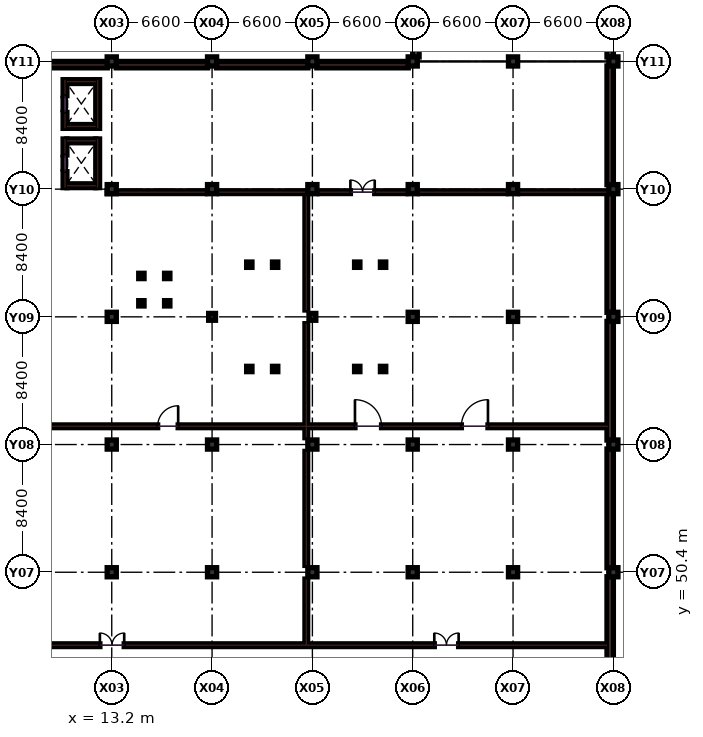
"""IFC4 building model, lengths in metres.
Left out: names, types, materials, properties, quantities, classifications, styles, units other than length and angle.
Written with IfcOpenShell. Run it as: python <this file> out.ifc"""

import sys

from ifc_helpers import new_model, si_unit, direction, frame, frame_2d, origin, origin_2d, place, context, subcontext, project, spatial, rectangle, extrude, element, fill, save


model = new_model("IFC4")
c1 = context("Model", 3, precision=1e-05, world=origin(), true_north=direction((0.0, 1.0)))
c2 = subcontext(c1, "Body", "Model", "MODEL_VIEW")
j1 = project(units=[si_unit("LENGTHUNIT", "METRE"), si_unit("PLANEANGLEUNIT", "RADIAN")], contexts=[c1])
p1 = place(None, origin())
s1 = spatial("IfcSite", under=j1, at=p1, CompositionType="ELEMENT")
p2 = place(p1, origin())
s2 = spatial("IfcBuilding", under=s1, at=p2, CompositionType="ELEMENT")
p3 = place(p2, frame((0.0, 0.0, -4.5)))
s3 = spatial("IfcBuildingStorey", under=s2, at=p3, CompositionType="ELEMENT", Elevation=-4.5)
for number, where, z_axis, x_axis in (
    (1, (13.2, 50.4, 0.0), (0.0, 0.0, 1.0), (1.0, 0.0, 0.0)),
    (2, (13.2, 58.8, 0.0), (0.0, 0.0, 1.0), (1.0, 0.0, 0.0)),
    (3, (13.2, 67.2, 0.0), (0.0, 0.0, 1.0), (1.0, 0.0, 0.0)),
    (4, (13.2, 75.6, 0.0), (0.0, 0.0, 1.0), (1.0, 0.0, 0.0)),
    (5, (13.2, 84.0, 0.0), (0.0, 0.0, 1.0), (1.0, 0.0, 0.0)),
    (6, (19.8, 50.4, 0.0), (0.0, 0.0, 1.0), (1.0, 0.0, 0.0)),
    (7, (19.8, 58.8, 0.0), (0.0, 0.0, 1.0), (1.0, 0.0, 0.0)),
):
    element("IfcColumn", number, at=place(p3, frame(where, z_axis=z_axis, x_axis=x_axis)), inside=s3, PredefinedType="COLUMN", context=c2, shape_type="SweptSolid", body=[
        extrude(rectangle(XDim=0.6, YDim=0.6, at=origin_2d()), origin(), (0.0, 0.0, 1.0), 4.5),
    ])
p4 = place(p3, frame((19.8, 67.2, 0.0), z_axis=(0.0, 0.0, 1.0), x_axis=(1.0, 0.0, 0.0)))
e8 = element("IfcColumn", 8, at=p4, inside=s3, PredefinedType="COLUMN", context=c2, shape_type="SweptSolid", body=[
    extrude(rectangle(XDim=0.45, YDim=0.45, at=origin_2d()), origin(), (0.0, 0.0, 1.0), 4.5),
])
for number, where, z_axis, x_axis in (
    (9, (19.8, 75.6, 0.0), (0.0, 0.0, 1.0), (1.0, 0.0, 0.0)),
    (10, (19.8, 84.0, 0.0), (0.0, 0.0, 1.0), (1.0, 0.0, 0.0)),
    (11, (26.4, 50.4, 0.0), (0.0, 0.0, 1.0), (1.0, 0.0, 0.0)),
    (12, (26.4, 58.8, 0.0), (0.0, 0.0, 1.0), (1.0, 0.0, 0.0)),
):
    element("IfcColumn", number, at=place(p3, frame(where, z_axis=z_axis, x_axis=x_axis)), inside=s3, PredefinedType="COLUMN", context=c2, shape_type="SweptSolid", body=[
        extrude(rectangle(XDim=0.6, YDim=0.6, at=origin_2d()), origin(), (0.0, 0.0, 1.0), 4.5),
    ])
p5 = place(p3, frame((26.4, 67.2, 0.0), z_axis=(0.0, 0.0, 1.0), x_axis=(1.0, 0.0, 0.0)))
e13 = element("IfcColumn", 13, at=p5, inside=s3, PredefinedType="COLUMN", context=c2, shape_type="SweptSolid", body=[
    extrude(rectangle(XDim=0.45, YDim=0.45, at=origin_2d()), origin(), (0.0, 0.0, 1.0), 4.5),
])
for number, where, z_axis, x_axis in (
    (14, (26.4, 75.6, 0.0), (0.0, 0.0, 1.0), (1.0, 0.0, 0.0)),
    (15, (26.4, 84.0, 0.0), (0.0, 0.0, 1.0), (1.0, 0.0, 0.0)),
    (16, (33.0, 50.4, 0.0), (0.0, 0.0, 1.0), (1.0, 0.0, 0.0)),
    (17, (33.0, 58.8, 0.0), (0.0, 0.0, 1.0), (1.0, 0.0, 0.0)),
    (18, (33.0, 67.2, 0.0), (0.0, 0.0, 1.0), (1.0, 0.0, 0.0)),
    (19, (33.0, 75.6, 0.0), (0.0, 0.0, 1.0), (1.0, 0.0, 0.0)),
    (20, (33.0, 84.0, 0.0), (0.0, 0.0, 1.0), (1.0, 0.0, 0.0)),
    (21, (39.6, 50.4, 0.0), (0.0, 0.0, 1.0), (1.0, 0.0, 0.0)),
    (22, (39.6, 58.8, 0.0), (0.0, 0.0, 1.0), (1.0, 0.0, 0.0)),
    (23, (39.6, 67.2, 0.0), (0.0, 0.0, 1.0), (1.0, 0.0, 0.0)),
    (24, (39.6, 75.6, 0.0), (0.0, 0.0, 1.0), (1.0, 0.0, 0.0)),
    (25, (39.6, 84.0, 0.0), (0.0, 0.0, 1.0), (1.0, 0.0, 0.0)),
    (26, (46.2, 50.4, 0.0), (0.0, 0.0, 1.0), (1.0, 0.0, 0.0)),
    (27, (46.2, 58.8, 0.0), (0.0, 0.0, 1.0), (1.0, 0.0, 0.0)),
    (28, (46.2, 67.2, 0.0), (0.0, 0.0, 1.0), (1.0, 0.0, 0.0)),
    (29, (46.2, 75.6, 0.0), (0.0, 0.0, 1.0), (1.0, 0.0, 0.0)),
    (30, (46.2, 84.0, 0.0), (0.0, 0.0, 1.0), (1.0, 0.0, 0.0)),
):
    element("IfcColumn", number, at=place(p3, frame(where, z_axis=z_axis, x_axis=x_axis)), inside=s3, PredefinedType="COLUMN", context=c2, shape_type="SweptSolid", body=[
        extrude(rectangle(XDim=0.6, YDim=0.6, at=origin_2d()), origin(), (0.0, 0.0, 1.0), 4.5),
    ])
p6 = place(p3, frame((0.42, 45.6, 0.0), z_axis=(0.0, 0.0, 1.0), x_axis=(1.0, 0.0, 0.0)))
e31 = element("IfcWall", 31, at=p6, inside=s3, PredefinedType="SOLIDWALL", context=c2, shape_type="SweptSolid", body=[
    extrude(rectangle(XDim=45.36, YDim=0.18, at=frame_2d((22.68, 0.0))), origin(), (0.0, 0.0, 1.0), 3.29),
])
p7 = place(p6, frame((12.0, 0.0, 0.0)))
e32 = element("IfcOpeningElement", 32, at=p7, cuts=e31, PredefinedType="OPENING", context=c2, shape_type="SweptSolid", body=[
    extrude(rectangle(XDim=1.6, YDim=2.2, at=frame_2d((0.8, 1.1))), frame((0.0, 0.1, 0.0), z_axis=(0.0, -1.0, 0.0), x_axis=(1.0, 0.0, 0.0)), (0.0, 0.0, 1.0), 0.2),
])
p8 = place(p6, frame((34.0, 0.0, 0.0)))
e33 = element("IfcOpeningElement", 33, at=p8, cuts=e31, PredefinedType="OPENING", context=c2, shape_type="SweptSolid", body=[
    extrude(rectangle(XDim=1.6, YDim=2.2, at=frame_2d((0.8, 1.1))), frame((0.0, 0.1, 0.0), z_axis=(0.0, -1.0, 0.0), x_axis=(1.0, 0.0, 0.0)), (0.0, 0.0, 1.0), 0.2),
])
p9 = place(p3, frame((26.0, 45.6, 0.0), z_axis=(0.0, 0.0, 1.0), x_axis=(0.0, 1.0, 0.0)))
e34 = element("IfcWall", 34, at=p9, inside=s3, PredefinedType="SOLIDWALL", context=c2, shape_type="SweptSolid", body=[
    extrude(rectangle(XDim=4.35, YDim=0.18, at=frame_2d((2.175, 0.0))), origin(), (0.0, 0.0, 1.0), 3.29),
])
for number, where, z_axis, x_axis in (
    (35, (26.0, 50.85, 0.0), (0.0, 0.0, 1.0), (0.0, 1.0, 0.0)),
    (36, (26.0, 59.25, 0.0), (0.0, 0.0, 1.0), (0.0, 1.0, 0.0)),
):
    element("IfcWall", number, at=place(p3, frame(where, z_axis=z_axis, x_axis=x_axis)), inside=s3, PredefinedType="SOLIDWALL", context=c2, shape_type="SweptSolid", body=[
        extrude(rectangle(XDim=7.5, YDim=0.18, at=frame_2d((3.75, 0.0))), origin(), (0.0, 0.0, 1.0), 3.29),
    ])
p10 = place(p3, frame((26.0, 67.65, 0.0), z_axis=(0.0, 0.0, 1.0), x_axis=(0.0, 1.0, 0.0)))
e37 = element("IfcWall", 37, at=p10, inside=s3, PredefinedType="SOLIDWALL", context=c2, shape_type="SweptSolid", body=[
    extrude(rectangle(XDim=7.75, YDim=0.18, at=frame_2d((3.875, 0.0))), origin(), (0.0, 0.0, 1.0), 3.29),
])
p11 = place(p3, frame((12.9, 75.4, 0.0), z_axis=(0.0, 0.0, 1.0), x_axis=(1.0, 0.0, 0.0)))
e38 = element("IfcWall", 38, at=p11, inside=s3, PredefinedType="SOLIDWALL", context=c2, shape_type="SweptSolid", body=[
    extrude(rectangle(XDim=6.45, YDim=0.18, at=frame_2d((3.225, 0.0))), origin(), (0.0, 0.0, 1.0), 3.275),
])
p12 = place(p3, frame((20.25, 75.4, 0.0), z_axis=(0.0, 0.0, 1.0), x_axis=(1.0, 0.0, 0.0)))
e39 = element("IfcWall", 39, at=p12, inside=s3, PredefinedType="SOLIDWALL", context=c2, shape_type="SweptSolid", body=[
    extrude(rectangle(XDim=5.7, YDim=0.18, at=frame_2d((2.85, 0.0))), origin(), (0.0, 0.0, 1.0), 3.275),
])
p13 = place(p3, frame((26.85, 75.4, 0.0), z_axis=(0.0, 0.0, 1.0), x_axis=(1.0, 0.0, 0.0)))
e40 = element("IfcWall", 40, at=p13, inside=s3, PredefinedType="SOLIDWALL", context=c2, shape_type="SweptSolid", body=[
    extrude(rectangle(XDim=5.7, YDim=0.18, at=frame_2d((2.85, 0.0))), origin(), (0.0, 0.0, 1.0), 3.275),
])
p14 = place(p13, frame((2.05, 0.0, 0.0)))
e41 = element("IfcOpeningElement", 41, at=p14, cuts=e40, PredefinedType="OPENING", context=c2, shape_type="SweptSolid", body=[
    extrude(rectangle(XDim=1.6, YDim=2.2, at=frame_2d((0.8, 1.1))), frame((0.0, 0.1, 0.0), z_axis=(0.0, -1.0, 0.0), x_axis=(1.0, 0.0, 0.0)), (0.0, 0.0, 1.0), 0.2),
])
p15 = place(p3, frame((33.45, 75.4, 0.0), z_axis=(0.0, 0.0, 1.0), x_axis=(1.0, 0.0, 0.0)))
e42 = element("IfcWall", 42, at=p15, inside=s3, PredefinedType="SOLIDWALL", context=c2, shape_type="SweptSolid", body=[
    extrude(rectangle(XDim=5.7, YDim=0.18, at=frame_2d((2.85, 0.0))), origin(), (0.0, 0.0, 1.0), 3.275),
])
p16 = place(p3, frame((40.05, 75.4, 0.0), z_axis=(0.0, 0.0, 1.0), x_axis=(1.0, 0.0, 0.0)))
e43 = element("IfcWall", 43, at=p16, inside=s3, PredefinedType="SOLIDWALL", context=c2, shape_type="SweptSolid", body=[
    extrude(rectangle(XDim=5.73, YDim=0.18, at=frame_2d((2.865, 0.0))), origin(), (0.0, 0.0, 1.0), 3.275),
])
p17 = place(p3, frame((0.42, 60.0, 0.0), z_axis=(0.0, 0.0, 1.0), x_axis=(1.0, 0.0, 0.0)))
e44 = element("IfcWall", 44, at=p17, inside=s3, PredefinedType="SOLIDWALL", context=c2, shape_type="SweptSolid", body=[
    extrude(rectangle(XDim=25.58, YDim=0.18, at=frame_2d((12.79, 0.0))), origin(), (0.0, 0.0, 1.0), 3.29),
])
p18 = place(p17, frame((3.2, 0.0, 0.0)))
e45 = element("IfcOpeningElement", 45, at=p18, cuts=e44, PredefinedType="OPENING", context=c2, shape_type="SweptSolid", body=[
    extrude(rectangle(XDim=1.35, YDim=2.2, at=frame_2d((0.675, 1.1))), frame((0.0, 0.1, 0.0), z_axis=(0.0, -1.0, 0.0), x_axis=(1.0, 0.0, 0.0)), (0.0, 0.0, 1.0), 0.2),
])
p19 = place(p17, frame((15.8, 0.0, 0.0)))
e46 = element("IfcOpeningElement", 46, at=p19, cuts=e44, PredefinedType="OPENING", context=c2, shape_type="SweptSolid", body=[
    extrude(rectangle(XDim=1.35, YDim=2.2, at=frame_2d((0.675, 1.1))), frame((0.0, 0.1, 0.0), z_axis=(0.0, -1.0, 0.0), x_axis=(1.0, 0.0, 0.0)), (0.0, 0.0, 1.0), 0.2),
])
p20 = place(p3, frame((26.0, 60.0, 0.0), z_axis=(0.0, 0.0, 1.0), x_axis=(1.0, 0.0, 0.0)))
e47 = element("IfcWall", 47, at=p20, inside=s3, PredefinedType="SOLIDWALL", context=c2, shape_type="SweptSolid", body=[
    extrude(rectangle(XDim=19.85, YDim=0.18, at=frame_2d((9.925, 0.0))), origin(), (0.0, 0.0, 1.0), 3.29),
])
p21 = place(p20, frame((3.2, 0.0, 0.0)))
e48 = element("IfcOpeningElement", 48, at=p21, cuts=e47, PredefinedType="OPENING", context=c2, shape_type="SweptSolid", body=[
    extrude(rectangle(XDim=1.75, YDim=2.3, at=frame_2d((0.875, 1.15))), frame((0.0, 0.1, 0.0), z_axis=(0.0, -1.0, 0.0), x_axis=(1.0, 0.0, 0.0)), (0.0, 0.0, 1.0), 0.2),
])
p22 = place(p20, frame((10.2, 0.0, 0.0)))
e49 = element("IfcOpeningElement", 49, at=p22, cuts=e47, PredefinedType="OPENING", context=c2, shape_type="SweptSolid", body=[
    extrude(rectangle(XDim=1.75, YDim=2.3, at=frame_2d((0.875, 1.15))), frame((0.0, 0.1, 0.0), z_axis=(0.0, -1.0, 0.0), x_axis=(1.0, 0.0, 0.0)), (0.0, 0.0, 1.0), 0.2),
])
p23 = place(p3, frame((12.905, 83.79, 0.0), z_axis=(0.0, 0.0, 1.0), x_axis=(-1.0, 0.0, 0.0)))
e50 = element("IfcWall", 50, at=p23, inside=s3, PredefinedType="SOLIDWALL", context=c2, shape_type="SweptSolid", body=[
    extrude(rectangle(XDim=6.01, YDim=0.42, at=frame_2d((3.005, 0.0))), origin(), (0.0, 0.0, 1.0), 4.14),
])
p24 = place(p3, frame((19.505, 83.79, 0.0), z_axis=(0.0, 0.0, 1.0), x_axis=(-1.0, 0.0, 0.0)))
e51 = element("IfcWall", 51, at=p24, inside=s3, PredefinedType="SOLIDWALL", context=c2, shape_type="SweptSolid", body=[
    extrude(rectangle(XDim=6.01, YDim=0.42, at=frame_2d((3.005, 0.0))), origin(), (0.0, 0.0, 1.0), 4.14),
])
for number, where, z_axis, x_axis in (
    (52, (26.105, 83.79, 0.0), (0.0, 0.0, 1.0), (-1.0, 0.0, 0.0)),
    (53, (32.705, 83.79, 0.0), (0.0, 0.0, 1.0), (-1.0, 0.0, 0.0)),
):
    element("IfcWall", number, at=place(p3, frame(where, z_axis=z_axis, x_axis=x_axis)), inside=s3, PredefinedType="SOLIDWALL", context=c2, shape_type="SweptSolid", body=[
        extrude(rectangle(XDim=6.01, YDim=0.42, at=frame_2d((3.005, 0.0))), origin(), (0.0, 0.0, 1.0), 4.14),
    ])
for number, where, z_axis, x_axis in (
    (54, (33.21, 92.105, 0.0), (0.0, 0.0, 1.0), (0.0, -1.0, 0.0)),
    (55, (45.99, 42.295, 0.0), (0.0, 0.0, 1.0), (0.0, 1.0, 0.0)),
):
    element("IfcWall", number, at=place(p3, frame(where, z_axis=z_axis, x_axis=x_axis)), inside=s3, PredefinedType="SOLIDWALL", context=c2, shape_type="SweptSolid", body=[
        extrude(rectangle(XDim=7.81, YDim=0.42, at=frame_2d((3.905, 0.0))), origin(), (0.0, 0.0, 1.0), 4.14),
    ])
p25 = place(p3, frame((45.99, 50.695, 0.0), z_axis=(0.0, 0.0, 1.0), x_axis=(0.0, 1.0, 0.0)))
e56 = element("IfcWall", 56, at=p25, inside=s3, PredefinedType="SOLIDWALL", context=c2, shape_type="SweptSolid", body=[
    extrude(rectangle(XDim=7.81, YDim=0.42, at=frame_2d((3.905, 0.0))), origin(), (0.0, 0.0, 1.0), 4.14),
])
p26 = place(p3, frame((45.99, 59.095, 0.0), z_axis=(0.0, 0.0, 1.0), x_axis=(0.0, 1.0, 0.0)))
e57 = element("IfcWall", 57, at=p26, inside=s3, PredefinedType="SOLIDWALL", context=c2, shape_type="SweptSolid", body=[
    extrude(rectangle(XDim=7.81, YDim=0.42, at=frame_2d((3.905, 0.0))), origin(), (0.0, 0.0, 1.0), 4.14),
])
p27 = place(p3, frame((45.99, 67.495, 0.0), z_axis=(0.0, 0.0, 1.0), x_axis=(0.0, 1.0, 0.0)))
e58 = element("IfcWall", 58, at=p27, inside=s3, PredefinedType="SOLIDWALL", context=c2, shape_type="SweptSolid", body=[
    extrude(rectangle(XDim=7.81, YDim=0.42, at=frame_2d((3.905, 0.0))), origin(), (0.0, 0.0, 1.0), 4.14),
])
for number, where, z_axis, x_axis in (
    (59, (45.99, 75.895, 0.0), (0.0, 0.0, 1.0), (0.0, 1.0, 0.0)),
    (60, (45.99, 84.295, 0.0), (0.0, 0.0, 1.0), (0.0, 1.0, 0.0)),
):
    element("IfcWall", number, at=place(p3, frame(where, z_axis=z_axis, x_axis=x_axis)), inside=s3, PredefinedType="SOLIDWALL", context=c2, shape_type="SweptSolid", body=[
        extrude(rectangle(XDim=7.81, YDim=0.42, at=frame_2d((3.905, 0.0))), origin(), (0.0, 0.0, 1.0), 4.14),
    ])
for number, where, z_axis, x_axis in (
    (61, (15.15, 68.09, 0.0), (0.0, 0.0, 1.0), (1.0, 0.0, 0.0)),
    (62, (16.85, 68.09, 0.0), (0.0, 0.0, 1.0), (1.0, 0.0, 0.0)),
    (63, (16.85, 69.89, 0.0), (0.0, 0.0, 1.0), (1.0, 0.0, 0.0)),
    (64, (15.15, 69.89, 0.0), (0.0, 0.0, 1.0), (1.0, 0.0, 0.0)),
    (65, (22.25, 63.77, 0.0), (0.0, 0.0, 1.0), (1.0, 0.0, 0.0)),
    (66, (23.95, 63.77, 0.0), (0.0, 0.0, 1.0), (1.0, 0.0, 0.0)),
    (67, (23.95, 70.63, 0.0), (0.0, 0.0, 1.0), (1.0, 0.0, 0.0)),
    (68, (22.25, 70.63, 0.0), (0.0, 0.0, 1.0), (1.0, 0.0, 0.0)),
    (69, (29.35, 63.77, 0.0), (0.0, 0.0, 1.0), (1.0, 0.0, 0.0)),
    (70, (31.05, 63.77, 0.0), (0.0, 0.0, 1.0), (1.0, 0.0, 0.0)),
    (71, (31.05, 70.63, 0.0), (0.0, 0.0, 1.0), (1.0, 0.0, 0.0)),
    (72, (29.35, 70.63, 0.0), (0.0, 0.0, 1.0), (1.0, 0.0, 0.0)),
):
    element("IfcColumn", number, at=place(p3, frame(where, z_axis=z_axis, x_axis=x_axis)), inside=s3, PredefinedType="COLUMN", context=c2, shape_type="SweptSolid", body=[
        extrude(rectangle(XDim=0.35, YDim=0.35, at=origin_2d()), origin(), (0.0, 0.0, 1.0), 4.5),
    ])
p28 = place(p3, frame((10.125, 75.7, 0.0), z_axis=(0.0, 0.0, 1.0), x_axis=(0.0, 1.0, 0.0)))
e73 = element("IfcWall", 73, at=p28, inside=s3, PredefinedType="SHEAR", context=c2, shape_type="SweptSolid", body=[
    extrude(rectangle(XDim=3.2, YDim=0.25, at=frame_2d((1.6, 0.0))), origin(), (0.0, 0.0, 1.0), 4.14),
])
p29 = place(p28, frame((1.05, 0.0, 0.0)))
e74 = element("IfcOpeningElement", 74, at=p29, cuts=e73, PredefinedType="OPENING", context=c2, shape_type="SweptSolid", body=[
    extrude(rectangle(XDim=1.1, YDim=2.15, at=frame_2d((0.55, 1.075))), frame((0.0, 0.135, 0.0), z_axis=(0.0, -1.0, 0.0), x_axis=(1.0, 0.0, 0.0)), (0.0, 0.0, 1.0), 0.27),
])
p30 = place(p3, frame((12.275, 75.7, 0.0), z_axis=(0.0, 0.0, 1.0), x_axis=(0.0, 1.0, 0.0)))
e75 = element("IfcWall", 75, at=p30, inside=s3, PredefinedType="SHEAR", context=c2, shape_type="SweptSolid", body=[
    extrude(rectangle(XDim=3.2, YDim=0.25, at=frame_2d((1.6, 0.0))), origin(), (0.0, 0.0, 1.0), 4.14),
])
for number, where, z_axis, x_axis in (
    (76, (10.25, 75.825, 0.0), (0.0, 0.0, 1.0), (1.0, 0.0, 0.0)),
    (77, (10.25, 78.775, 0.0), (0.0, 0.0, 1.0), (1.0, 0.0, 0.0)),
):
    element("IfcWall", number, at=place(p3, frame(where, z_axis=z_axis, x_axis=x_axis)), inside=s3, PredefinedType="SHEAR", context=c2, shape_type="SweptSolid", body=[
        extrude(rectangle(XDim=1.9, YDim=0.25, at=frame_2d((0.95, 0.0))), origin(), (0.0, 0.0, 1.0), 4.14),
    ])
p31 = place(p3, frame((10.125, 79.6, 0.0), z_axis=(0.0, 0.0, 1.0), x_axis=(0.0, 1.0, 0.0)))
e78 = element("IfcWall", 78, at=p31, inside=s3, PredefinedType="SHEAR", context=c2, shape_type="SweptSolid", body=[
    extrude(rectangle(XDim=3.2, YDim=0.25, at=frame_2d((1.6, 0.0))), origin(), (0.0, 0.0, 1.0), 4.14),
])
p32 = place(p31, frame((1.05, 0.0, 0.0)))
e79 = element("IfcOpeningElement", 79, at=p32, cuts=e78, PredefinedType="OPENING", context=c2, shape_type="SweptSolid", body=[
    extrude(rectangle(XDim=1.1, YDim=2.15, at=frame_2d((0.55, 1.075))), frame((0.0, 0.135, 0.0), z_axis=(0.0, -1.0, 0.0), x_axis=(1.0, 0.0, 0.0)), (0.0, 0.0, 1.0), 0.27),
])
p33 = place(p3, frame((12.275, 79.6, 0.0), z_axis=(0.0, 0.0, 1.0), x_axis=(0.0, 1.0, 0.0)))
e80 = element("IfcWall", 80, at=p33, inside=s3, PredefinedType="SHEAR", context=c2, shape_type="SweptSolid", body=[
    extrude(rectangle(XDim=3.2, YDim=0.25, at=frame_2d((1.6, 0.0))), origin(), (0.0, 0.0, 1.0), 4.14),
])
for number, where, z_axis, x_axis in (
    (81, (10.25, 79.725, 0.0), (0.0, 0.0, 1.0), (1.0, 0.0, 0.0)),
    (82, (10.25, 82.675, 0.0), (0.0, 0.0, 1.0), (1.0, 0.0, 0.0)),
):
    element("IfcWall", number, at=place(p3, frame(where, z_axis=z_axis, x_axis=x_axis)), inside=s3, PredefinedType="SHEAR", context=c2, shape_type="SweptSolid", body=[
        extrude(rectangle(XDim=1.9, YDim=0.25, at=frame_2d((0.95, 0.0))), origin(), (0.0, 0.0, 1.0), 4.14),
    ])
p34 = place(p7, origin())
e83 = element("IfcDoor", 83, at=p34, inside=s3, OperationType="DOUBLE_DOOR_SINGLE_SWING", PredefinedType="DOOR", context=c2, shape_type="SweptSolid", body=[
    extrude(rectangle(XDim=1.6, YDim=2.2, at=frame_2d((0.8, 1.1))), frame((0.0, 0.025, 0.0), z_axis=(0.0, -1.0, 0.0), x_axis=(1.0, 0.0, 0.0)), (0.0, 0.0, 1.0), 0.05),
])
fill(e32, e83)
p35 = place(p8, origin())
e84 = element("IfcDoor", 84, at=p35, inside=s3, OperationType="DOUBLE_DOOR_SINGLE_SWING", PredefinedType="DOOR", context=c2, shape_type="SweptSolid", body=[
    extrude(rectangle(XDim=1.6, YDim=2.2, at=frame_2d((0.8, 1.1))), frame((0.0, 0.025, 0.0), z_axis=(0.0, -1.0, 0.0), x_axis=(1.0, 0.0, 0.0)), (0.0, 0.0, 1.0), 0.05),
])
fill(e33, e84)
p36 = place(p14, origin())
e85 = element("IfcDoor", 85, at=p36, inside=s3, OperationType="DOUBLE_DOOR_SINGLE_SWING", PredefinedType="DOOR", context=c2, shape_type="SweptSolid", body=[
    extrude(rectangle(XDim=1.6, YDim=2.2, at=frame_2d((0.8, 1.1))), frame((0.0, 0.025, 0.0), z_axis=(0.0, -1.0, 0.0), x_axis=(1.0, 0.0, 0.0)), (0.0, 0.0, 1.0), 0.05),
])
fill(e41, e85)
p37 = place(p19, origin())
e86 = element("IfcDoor", 86, at=p37, inside=s3, OperationType="SINGLE_SWING_RIGHT", PredefinedType="DOOR", context=c2, shape_type="SweptSolid", body=[
    extrude(rectangle(XDim=1.35, YDim=2.2, at=frame_2d((0.675, 1.1))), frame((0.0, 0.025, 0.0), z_axis=(0.0, -1.0, 0.0), x_axis=(1.0, 0.0, 0.0)), (0.0, 0.0, 1.0), 0.05),
])
fill(e46, e86)
p38 = place(p21, origin())
e87 = element("IfcDoor", 87, at=p38, inside=s3, OperationType="SINGLE_SWING_LEFT", PredefinedType="DOOR", context=c2, shape_type="SweptSolid", body=[
    extrude(rectangle(XDim=1.75, YDim=2.3, at=frame_2d((0.875, 1.15))), frame((0.0, 0.025, 0.0), z_axis=(0.0, -1.0, 0.0), x_axis=(1.0, 0.0, 0.0)), (0.0, 0.0, 1.0), 0.05),
])
fill(e48, e87)
p39 = place(p22, origin())
e88 = element("IfcDoor", 88, at=p39, inside=s3, OperationType="SINGLE_SWING_RIGHT", PredefinedType="DOOR", context=c2, shape_type="SweptSolid", body=[
    extrude(rectangle(XDim=1.75, YDim=2.3, at=frame_2d((0.875, 1.15))), frame((0.0, 0.025, 0.0), z_axis=(0.0, -1.0, 0.0), x_axis=(1.0, 0.0, 0.0)), (0.0, 0.0, 1.0), 0.05),
])
fill(e49, e88)
p40 = place(p29, origin())
e89 = element("IfcDoor", 89, at=p40, inside=s3, OperationType="SLIDING_TO_LEFT", PredefinedType="DOOR", context=c2, shape_type="SweptSolid", body=[
    extrude(rectangle(XDim=1.1, YDim=2.15, at=frame_2d((0.55, 1.075))), frame((0.0, 0.025, 0.0), z_axis=(0.0, -1.0, 0.0), x_axis=(1.0, 0.0, 0.0)), (0.0, 0.0, 1.0), 0.05),
])
fill(e74, e89)
p41 = place(p32, origin())
e90 = element("IfcDoor", 90, at=p41, inside=s3, OperationType="SLIDING_TO_LEFT", PredefinedType="DOOR", context=c2, shape_type="SweptSolid", body=[
    extrude(rectangle(XDim=1.1, YDim=2.15, at=frame_2d((0.55, 1.075))), frame((0.0, 0.025, 0.0), z_axis=(0.0, -1.0, 0.0), x_axis=(1.0, 0.0, 0.0)), (0.0, 0.0, 1.0), 0.05),
])
fill(e79, e90)
save(model, sys.argv[1])
